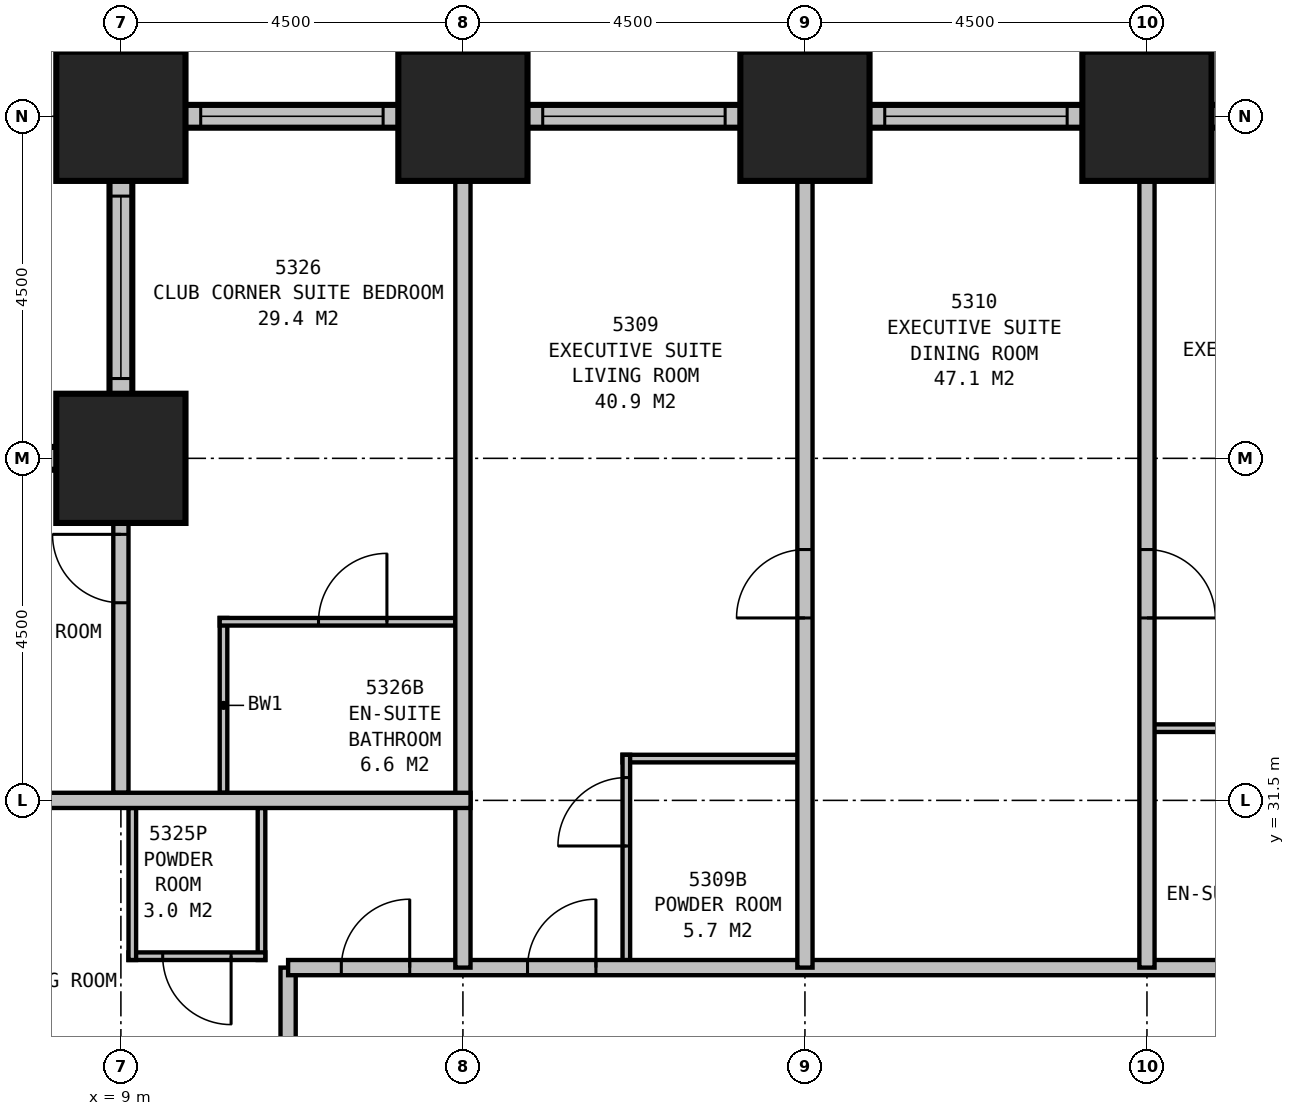
"""IFC4 building model, lengths in metres.
Left out: names, types, materials, properties, quantities, classifications, styles, units other than length and angle.
Written with IfcOpenShell. Run it as: python <this file> out.ifc"""

import sys

from ifc_helpers import new_model, si_unit, direction, frame, frame_2d, origin, origin_2d, place, context, subcontext, project, spatial, rectangle, extrude, element, fill, save


model = new_model("IFC4")
c1 = context("Model", 3, precision=1e-05, world=origin(), true_north=direction((0.0, 1.0)))
c2 = subcontext(c1, "Body", "Model", "MODEL_VIEW")
j1 = project(units=[si_unit("LENGTHUNIT", "METRE"), si_unit("PLANEANGLEUNIT", "RADIAN")], contexts=[c1])
p1 = place(None, origin())
s1 = spatial("IfcSite", under=j1, at=p1, CompositionType="ELEMENT")
p2 = place(p1, origin())
s2 = spatial("IfcBuilding", under=s1, at=p2, CompositionType="ELEMENT")
p3 = place(p2, frame((0.0, 0.0, 204.4)))
s3 = spatial("IfcBuildingStorey", under=s2, at=p3, CompositionType="ELEMENT", Elevation=204.4)
for number, where, z_axis, x_axis in (
    (1, (22.5, 40.5, 0.0), (0.0, 0.0, 1.0), (1.0, 0.0, 0.0)),
    (2, (18.0, 40.5, 0.0), (0.0, 0.0, 1.0), (1.0, 0.0, 0.0)),
    (3, (13.5, 40.5, 0.0), (0.0, 0.0, 1.0), (1.0, 0.0, 0.0)),
    (4, (9.0, 40.5, 0.0), (0.0, 0.0, 1.0), (1.0, 0.0, 0.0)),
    (5, (9.0, 36.0, 0.0), (0.0, 0.0, 1.0), (1.0, 0.0, 0.0)),
):
    element("IfcColumn", number, at=place(p3, frame(where, z_axis=z_axis, x_axis=x_axis)), inside=s3, PredefinedType="COLUMN", context=c2, shape_type="SweptSolid", body=[
        extrude(rectangle(XDim=1.7, YDim=1.7, at=origin_2d()), origin(), (0.0, 0.0, 1.0), 3.5),
    ])
p4 = place(p3, frame((40.65, 40.5, 0.0), z_axis=(0.0, 0.0, 1.0), x_axis=(-1.0, 0.0, 0.0)))
e6 = element("IfcWall", 6, at=p4, inside=s3, PredefinedType="STANDARD", context=c2, shape_type="SweptSolid", body=[
    extrude(rectangle(XDim=31.8, YDim=0.3, at=frame_2d((15.9, 0.0))), origin(), (0.0, 0.0, 1.0), 2.25),
])
p5 = place(p4, frame((1.2, 0.0, 0.5)))
e7 = element("IfcOpeningElement", 7, at=p5, cuts=e6, PredefinedType="OPENING", context=c2, shape_type="SweptSolid", body=[
    extrude(rectangle(XDim=2.4, YDim=1.6, at=frame_2d((1.2, 0.8))), frame((0.0, 0.16, 0.0), z_axis=(0.0, -1.0, 0.0), x_axis=(1.0, 0.0, 0.0)), (0.0, 0.0, 1.0), 0.32),
])
p6 = place(p4, frame((5.7, 0.0, 0.5)))
e8 = element("IfcOpeningElement", 8, at=p6, cuts=e6, PredefinedType="OPENING", context=c2, shape_type="SweptSolid", body=[
    extrude(rectangle(XDim=2.4, YDim=1.6, at=frame_2d((1.2, 0.8))), frame((0.0, 0.16, 0.0), z_axis=(0.0, -1.0, 0.0), x_axis=(1.0, 0.0, 0.0)), (0.0, 0.0, 1.0), 0.32),
])
p7 = place(p4, frame((10.2, 0.0, 0.5)))
e9 = element("IfcOpeningElement", 9, at=p7, cuts=e6, PredefinedType="OPENING", context=c2, shape_type="SweptSolid", body=[
    extrude(rectangle(XDim=2.4, YDim=1.6, at=frame_2d((1.2, 0.8))), frame((0.0, 0.16, 0.0), z_axis=(0.0, -1.0, 0.0), x_axis=(1.0, 0.0, 0.0)), (0.0, 0.0, 1.0), 0.32),
])
p8 = place(p4, frame((14.7, 0.0, 0.5)))
e10 = element("IfcOpeningElement", 10, at=p8, cuts=e6, PredefinedType="OPENING", context=c2, shape_type="SweptSolid", body=[
    extrude(rectangle(XDim=2.4, YDim=1.6, at=frame_2d((1.2, 0.8))), frame((0.0, 0.16, 0.0), z_axis=(0.0, -1.0, 0.0), x_axis=(1.0, 0.0, 0.0)), (0.0, 0.0, 1.0), 0.32),
])
p9 = place(p4, frame((19.2, 0.0, 0.5)))
e11 = element("IfcOpeningElement", 11, at=p9, cuts=e6, PredefinedType="OPENING", context=c2, shape_type="SweptSolid", body=[
    extrude(rectangle(XDim=2.4, YDim=1.6, at=frame_2d((1.2, 0.8))), frame((0.0, 0.16, 0.0), z_axis=(0.0, -1.0, 0.0), x_axis=(1.0, 0.0, 0.0)), (0.0, 0.0, 1.0), 0.32),
])
p10 = place(p4, frame((23.7, 0.0, 0.5)))
e12 = element("IfcOpeningElement", 12, at=p10, cuts=e6, PredefinedType="OPENING", context=c2, shape_type="SweptSolid", body=[
    extrude(rectangle(XDim=2.4, YDim=1.6, at=frame_2d((1.2, 0.8))), frame((0.0, 0.16, 0.0), z_axis=(0.0, -1.0, 0.0), x_axis=(1.0, 0.0, 0.0)), (0.0, 0.0, 1.0), 0.32),
])
p11 = place(p4, frame((28.2, 0.0, 0.5)))
e13 = element("IfcOpeningElement", 13, at=p11, cuts=e6, PredefinedType="OPENING", context=c2, shape_type="SweptSolid", body=[
    extrude(rectangle(XDim=2.4, YDim=1.6, at=frame_2d((1.2, 0.8))), frame((0.0, 0.16, 0.0), z_axis=(0.0, -1.0, 0.0), x_axis=(1.0, 0.0, 0.0)), (0.0, 0.0, 1.0), 0.32),
])
p12 = place(p3, frame((9.0, 40.65, 0.0), z_axis=(0.0, 0.0, 1.0), x_axis=(0.0, -1.0, 0.0)))
e14 = element("IfcWall", 14, at=p12, inside=s3, PredefinedType="STANDARD", context=c2, shape_type="SweptSolid", body=[
    extrude(rectangle(XDim=4.8, YDim=0.3, at=frame_2d((2.4, 0.0))), origin(), (0.0, 0.0, 1.0), 2.25),
])
p13 = place(p12, frame((1.2, 0.0, 0.5)))
e15 = element("IfcOpeningElement", 15, at=p13, cuts=e14, PredefinedType="OPENING", context=c2, shape_type="SweptSolid", body=[
    extrude(rectangle(XDim=2.4, YDim=1.6, at=frame_2d((1.2, 0.8))), frame((0.0, 0.16, 0.0), z_axis=(0.0, -1.0, 0.0), x_axis=(1.0, 0.0, 0.0)), (0.0, 0.0, 1.0), 0.32),
])
p14 = place(p3, frame((9.15, 36.0, 0.0), z_axis=(0.0, 0.0, 1.0), x_axis=(-1.0, 0.0, 0.0)))
e16 = element("IfcWall", 16, at=p14, inside=s3, PredefinedType="STANDARD", context=c2, shape_type="SweptSolid", body=[
    extrude(rectangle(XDim=5.3, YDim=0.3, at=frame_2d((2.65, 0.0))), origin(), (0.0, 0.0, 1.0), 2.25),
])
p15 = place(p14, frame((1.45, 0.0, 0.5)))
e17 = element("IfcOpeningElement", 17, at=p15, cuts=e16, PredefinedType="OPENING", context=c2, shape_type="SweptSolid", body=[
    extrude(rectangle(XDim=2.4, YDim=1.6, at=frame_2d((1.2, 0.8))), frame((0.0, 0.16, 0.0), z_axis=(0.0, -1.0, 0.0), x_axis=(1.0, 0.0, 0.0)), (0.0, 0.0, 1.0), 0.32),
])
p16 = place(p3, frame((11.2, 29.3, 0.0), z_axis=(0.0, 0.0, 1.0), x_axis=(1.0, 0.0, 0.0)))
e18 = element("IfcWall", 18, at=p16, inside=s3, PredefinedType="PARTITIONING", context=c2, shape_type="SweptSolid", body=[
    extrude(rectangle(XDim=27.1, YDim=0.2, at=frame_2d((13.55, 0.0))), origin(), (0.0, 0.0, 1.0), 3.25),
])
p17 = place(p16, frame((3.15, 0.0, 0.0)))
e19 = element("IfcOpeningElement", 19, at=p17, cuts=e18, PredefinedType="OPENING", context=c2, shape_type="SweptSolid", body=[
    extrude(rectangle(XDim=0.9, YDim=2.1, at=frame_2d((0.45, 1.05))), frame((0.0, 0.11, 0.0), z_axis=(0.0, -1.0, 0.0), x_axis=(1.0, 0.0, 0.0)), (0.0, 0.0, 1.0), 0.22),
])
p18 = place(p16, frame((16.65, 0.0, 0.0)))
e20 = element("IfcOpeningElement", 20, at=p18, cuts=e18, PredefinedType="OPENING", context=c2, shape_type="SweptSolid", body=[
    extrude(rectangle(XDim=0.9, YDim=2.1, at=frame_2d((0.45, 1.05))), frame((0.0, 0.11, 0.0), z_axis=(0.0, -1.0, 0.0), x_axis=(1.0, 0.0, 0.0)), (0.0, 0.0, 1.0), 0.22),
])
p19 = place(p16, frame((25.5, 0.0, 0.0)))
e21 = element("IfcOpeningElement", 21, at=p19, cuts=e18, PredefinedType="OPENING", context=c2, shape_type="SweptSolid", body=[
    extrude(rectangle(XDim=0.9, YDim=2.1, at=frame_2d((0.45, 1.05))), frame((0.0, 0.11, 0.0), z_axis=(0.0, -1.0, 0.0), x_axis=(1.0, 0.0, 0.0)), (0.0, 0.0, 1.0), 0.22),
])
p20 = place(p16, frame((0.7, 0.0, 0.0)))
e22 = element("IfcOpeningElement", 22, at=p20, cuts=e18, PredefinedType="OPENING", context=c2, shape_type="SweptSolid", body=[
    extrude(rectangle(XDim=0.9, YDim=2.1, at=frame_2d((0.45, 1.05))), frame((0.0, 0.11, 0.0), z_axis=(0.0, -1.0, 0.0), x_axis=(1.0, 0.0, 0.0)), (0.0, 0.0, 1.0), 0.22),
])
p21 = place(p3, frame((11.2, 10.6, 0.0), z_axis=(0.0, 0.0, 1.0), x_axis=(0.0, 1.0, 0.0)))
e23 = element("IfcWall", 23, at=p21, inside=s3, PredefinedType="PARTITIONING", context=c2, shape_type="SweptSolid", body=[
    extrude(rectangle(XDim=18.7, YDim=0.2, at=frame_2d((9.35, 0.0))), origin(), (0.0, 0.0, 1.0), 3.25),
])
p22 = place(p21, frame((4.9, 0.0, 0.0)))
e24 = element("IfcOpeningElement", 24, at=p22, cuts=e23, PredefinedType="OPENING", context=c2, shape_type="SweptSolid", body=[
    extrude(rectangle(XDim=1.0, YDim=2.1, at=frame_2d((0.5, 1.05))), frame((0.0, 0.11, 0.0), z_axis=(0.0, -1.0, 0.0), x_axis=(1.0, 0.0, 0.0)), (0.0, 0.0, 1.0), 0.22),
])
p23 = place(p21, frame((9.35, 0.0, 0.0)))
e25 = element("IfcOpeningElement", 25, at=p23, cuts=e23, PredefinedType="OPENING", context=c2, shape_type="SweptSolid", body=[
    extrude(rectangle(XDim=0.9, YDim=2.1, at=frame_2d((0.45, 1.05))), frame((0.0, 0.11, 0.0), z_axis=(0.0, -1.0, 0.0), x_axis=(1.0, 0.0, 0.0)), (0.0, 0.0, 1.0), 0.22),
])
p24 = place(p3, frame((18.0, 29.3, 0.0), z_axis=(0.0, 0.0, 1.0), x_axis=(0.0, 1.0, 0.0)))
e26 = element("IfcWall", 26, at=p24, inside=s3, PredefinedType="PARTITIONING", context=c2, shape_type="SweptSolid", body=[
    extrude(rectangle(XDim=11.2, YDim=0.2, at=frame_2d((5.6, 0.0))), origin(), (0.0, 0.0, 1.0), 2.25),
])
p25 = place(p24, frame((4.6, 0.0, 0.0)))
e27 = element("IfcOpeningElement", 27, at=p25, cuts=e26, PredefinedType="OPENING", context=c2, shape_type="SweptSolid", body=[
    extrude(rectangle(XDim=0.9, YDim=2.1, at=frame_2d((0.45, 1.05))), frame((0.0, 0.11, 0.0), z_axis=(0.0, -1.0, 0.0), x_axis=(1.0, 0.0, 0.0)), (0.0, 0.0, 1.0), 0.22),
])
p26 = place(p3, frame((22.5, 29.3, 0.0), z_axis=(0.0, 0.0, 1.0), x_axis=(0.0, 1.0, 0.0)))
e28 = element("IfcWall", 28, at=p26, inside=s3, PredefinedType="PARTITIONING", context=c2, shape_type="SweptSolid", body=[
    extrude(rectangle(XDim=11.2, YDim=0.2, at=frame_2d((5.6, 0.0))), origin(), (0.0, 0.0, 1.0), 2.25),
])
p27 = place(p26, frame((5.5, 0.0, 0.0), z_axis=(0.0, 0.0, 1.0), x_axis=(-1.0, 0.0, 0.0)))
e29 = element("IfcOpeningElement", 29, at=p27, cuts=e28, PredefinedType="OPENING", context=c2, shape_type="SweptSolid", body=[
    extrude(rectangle(XDim=0.9, YDim=2.1, at=frame_2d((0.45, 1.05))), frame((0.0, 0.11, 0.0), z_axis=(0.0, -1.0, 0.0), x_axis=(1.0, 0.0, 0.0)), (0.0, 0.0, 1.0), 0.22),
])
p28 = place(p3, frame((15.6, 32.05, 0.0), z_axis=(0.0, 0.0, 1.0), x_axis=(1.0, 0.0, 0.0)))
e30 = element("IfcWall", 30, at=p28, inside=s3, PredefinedType="PLUMBINGWALL", context=c2, shape_type="SweptSolid", body=[
    extrude(rectangle(XDim=2.4, YDim=0.1, at=frame_2d((1.2, 0.0))), origin(), (0.0, 0.0, 1.0), 3.25),
])
p29 = place(p3, frame((15.65, 29.3, 0.0), z_axis=(0.0, 0.0, 1.0), x_axis=(0.0, 1.0, 0.0)))
e31 = element("IfcWall", 31, at=p29, inside=s3, PredefinedType="PLUMBINGWALL", context=c2, shape_type="SweptSolid", body=[
    extrude(rectangle(XDim=2.8, YDim=0.1, at=frame_2d((1.4, 0.0))), origin(), (0.0, 0.0, 1.0), 3.25),
])
p30 = place(p29, frame((1.6, 0.0, 0.0)))
e32 = element("IfcOpeningElement", 32, at=p30, cuts=e31, PredefinedType="OPENING", context=c2, shape_type="SweptSolid", body=[
    extrude(rectangle(XDim=0.9, YDim=2.1, at=frame_2d((0.45, 1.05))), frame((0.0, 0.06, 0.0), z_axis=(0.0, -1.0, 0.0), x_axis=(1.0, 0.0, 0.0)), (0.0, 0.0, 1.0), 0.12),
])
p31 = place(p3, frame((22.5, 32.45, 0.0), z_axis=(0.0, 0.0, 1.0), x_axis=(1.0, 0.0, 0.0)))
e33 = element("IfcWall", 33, at=p31, inside=s3, PredefinedType="PLUMBINGWALL", context=c2, shape_type="SweptSolid", body=[
    extrude(rectangle(XDim=3.15, YDim=0.1, at=frame_2d((1.575, 0.0))), origin(), (0.0, 0.0, 1.0), 3.25),
])
p32 = place(p3, frame((13.5, 29.3, 0.0), z_axis=(0.0, 0.0, 1.0), x_axis=(0.0, 1.0, 0.0)))
e34 = element("IfcWall", 34, at=p32, inside=s3, PredefinedType="PARTITIONING", context=c2, shape_type="SweptSolid", body=[
    extrude(rectangle(XDim=11.2, YDim=0.2, at=frame_2d((5.6, 0.0))), origin(), (0.0, 0.0, 1.0), 2.25),
])
p33 = place(p3, frame((13.6, 31.5, 0.0), z_axis=(0.0, 0.0, 1.0), x_axis=(-1.0, 0.0, 0.0)))
e35 = element("IfcWall", 35, at=p33, inside=s3, PredefinedType="PARTITIONING", context=c2, shape_type="SweptSolid", body=[
    extrude(rectangle(XDim=10.099, YDim=0.2, at=frame_2d((5.05, 0.0))), origin(), (0.0, 0.0, 1.0), 3.25),
])
p34 = place(p33, frame((8.999, 0.0, 0.0), z_axis=(0.0, 0.0, 1.0), x_axis=(-1.0, 0.0, 0.0)))
e36 = element("IfcOpeningElement", 36, at=p34, cuts=e35, PredefinedType="OPENING", context=c2, shape_type="SweptSolid", body=[
    extrude(rectangle(XDim=0.9, YDim=2.1, at=frame_2d((0.45, 1.05))), frame((0.0, 0.11, 0.0), z_axis=(0.0, -1.0, 0.0), x_axis=(1.0, 0.0, 0.0)), (0.0, 0.0, 1.0), 0.22),
])
p35 = place(p3, frame((9.15, 31.4, 0.0), z_axis=(0.0, 0.0, 1.0), x_axis=(0.0, -1.0, 0.0)))
e37 = element("IfcWall", 37, at=p35, inside=s3, PredefinedType="PLUMBINGWALL", context=c2, shape_type="SweptSolid", body=[
    extrude(rectangle(XDim=2.0, YDim=0.1, at=frame_2d((1.0, 0.0))), origin(), (0.0, 0.0, 1.0), 2.25),
])
p36 = place(p3, frame((10.85, 31.4, 0.0), z_axis=(0.0, 0.0, 1.0), x_axis=(0.0, -1.0, 0.0)))
e38 = element("IfcWall", 38, at=p36, inside=s3, PredefinedType="PLUMBINGWALL", context=c2, shape_type="SweptSolid", body=[
    extrude(rectangle(XDim=2.0, YDim=0.1, at=frame_2d((1.0, 0.0))), origin(), (0.0, 0.0, 1.0), 3.25),
])
p37 = place(p3, frame((10.9, 29.45, 0.0), z_axis=(0.0, 0.0, 1.0), x_axis=(-1.0, 0.0, 0.0)))
e39 = element("IfcWall", 39, at=p37, inside=s3, PredefinedType="PLUMBINGWALL", context=c2, shape_type="SweptSolid", body=[
    extrude(rectangle(XDim=1.8, YDim=0.1, at=frame_2d((0.9, 0.0))), origin(), (0.0, 0.0, 1.0), 3.25),
])
p38 = place(p37, frame((0.45, 0.0, 0.0)))
e40 = element("IfcOpeningElement", 40, at=p38, cuts=e39, PredefinedType="OPENING", context=c2, shape_type="SweptSolid", body=[
    extrude(rectangle(XDim=0.9, YDim=2.1, at=frame_2d((0.45, 1.05))), frame((0.0, 0.06, 0.0), z_axis=(0.0, -1.0, 0.0), x_axis=(1.0, 0.0, 0.0)), (0.0, 0.0, 1.0), 0.12),
])
p39 = place(p3, frame((9.0, 31.6, 0.0), z_axis=(0.0, 0.0, 1.0), x_axis=(0.0, 1.0, 0.0)))
e41 = element("IfcWall", 41, at=p39, inside=s3, PredefinedType="PARTITIONING", context=c2, shape_type="SweptSolid", body=[
    extrude(rectangle(XDim=4.4, YDim=0.2, at=frame_2d((2.2, 0.0))), origin(), (0.0, 0.0, 1.0), 2.25),
])
p40 = place(p39, frame((2.5, 0.0, 0.0)))
e42 = element("IfcOpeningElement", 42, at=p40, cuts=e41, PredefinedType="OPENING", context=c2, shape_type="SweptSolid", body=[
    extrude(rectangle(XDim=0.9, YDim=2.1, at=frame_2d((0.45, 1.05))), frame((0.0, 0.11, 0.0), z_axis=(0.0, -1.0, 0.0), x_axis=(1.0, 0.0, 0.0)), (0.0, 0.0, 1.0), 0.22),
])
p41 = place(p3, frame((10.35, 31.6, 0.0), z_axis=(0.0, 0.0, 1.0), x_axis=(0.0, 1.0, 0.0)))
e43 = element("IfcWall", 43, at=p41, inside=s3, PredefinedType="PLUMBINGWALL", context=c2, shape_type="SweptSolid", body=[
    extrude(rectangle(XDim=2.3, YDim=0.1, at=frame_2d((1.15, 0.0))), origin(), (0.0, 0.0, 1.0), 3.25),
])
p42 = place(p3, frame((13.4, 33.85, 0.0), z_axis=(0.0, 0.0, 1.0), x_axis=(-1.0, 0.0, 0.0)))
e44 = element("IfcWall", 44, at=p42, inside=s3, PredefinedType="PLUMBINGWALL", context=c2, shape_type="SweptSolid", body=[
    extrude(rectangle(XDim=3.1, YDim=0.1, at=frame_2d((1.55, 0.0))), origin(), (0.0, 0.0, 1.0), 3.25),
])
p43 = place(p42, frame((1.8, 0.0, 0.0), z_axis=(0.0, 0.0, 1.0), x_axis=(-1.0, 0.0, 0.0)))
e45 = element("IfcOpeningElement", 45, at=p43, cuts=e44, PredefinedType="OPENING", context=c2, shape_type="SweptSolid", body=[
    extrude(rectangle(XDim=0.9, YDim=2.1, at=frame_2d((0.45, 1.05))), frame((0.0, 0.06, 0.0), z_axis=(0.0, -1.0, 0.0), x_axis=(1.0, 0.0, 0.0)), (0.0, 0.0, 1.0), 0.12),
])
p44 = place(p9, origin())
e46 = element("IfcWindow", 46, at=p44, inside=s3, PartitioningType="SINGLE_PANEL", PredefinedType="WINDOW", context=c2, shape_type="SweptSolid", body=[
    extrude(rectangle(XDim=2.4, YDim=1.6, at=frame_2d((1.2, 0.8))), frame((0.0, 0.03, 0.0), z_axis=(0.0, -1.0, 0.0), x_axis=(1.0, 0.0, 0.0)), (0.0, 0.0, 1.0), 0.06),
])
fill(e11, e46)
p45 = place(p10, origin())
e47 = element("IfcWindow", 47, at=p45, inside=s3, PartitioningType="SINGLE_PANEL", PredefinedType="WINDOW", context=c2, shape_type="SweptSolid", body=[
    extrude(rectangle(XDim=2.4, YDim=1.6, at=frame_2d((1.2, 0.8))), frame((0.0, 0.03, 0.0), z_axis=(0.0, -1.0, 0.0), x_axis=(1.0, 0.0, 0.0)), (0.0, 0.0, 1.0), 0.06),
])
fill(e12, e47)
p46 = place(p11, origin())
e48 = element("IfcWindow", 48, at=p46, inside=s3, PartitioningType="SINGLE_PANEL", PredefinedType="WINDOW", context=c2, shape_type="SweptSolid", body=[
    extrude(rectangle(XDim=2.4, YDim=1.6, at=frame_2d((1.2, 0.8))), frame((0.0, 0.03, 0.0), z_axis=(0.0, -1.0, 0.0), x_axis=(1.0, 0.0, 0.0)), (0.0, 0.0, 1.0), 0.06),
])
fill(e13, e48)
p47 = place(p13, origin())
e49 = element("IfcWindow", 49, at=p47, inside=s3, PartitioningType="SINGLE_PANEL", PredefinedType="WINDOW", context=c2, shape_type="SweptSolid", body=[
    extrude(rectangle(XDim=2.4, YDim=1.6, at=frame_2d((1.2, 0.8))), frame((0.0, 0.03, 0.0), z_axis=(0.0, -1.0, 0.0), x_axis=(1.0, 0.0, 0.0)), (0.0, 0.0, 1.0), 0.06),
])
fill(e15, e49)
p48 = place(p17, origin())
e50 = element("IfcDoor", 50, at=p48, inside=s3, OperationType="SINGLE_SWING_RIGHT", PredefinedType="DOOR", context=c2, shape_type="SweptSolid", body=[
    extrude(rectangle(XDim=0.9, YDim=2.1, at=frame_2d((0.45, 1.05))), frame((0.0, 0.025, 0.0), z_axis=(0.0, -1.0, 0.0), x_axis=(1.0, 0.0, 0.0)), (0.0, 0.0, 1.0), 0.05),
])
fill(e19, e50)
p49 = place(p20, origin())
e51 = element("IfcDoor", 51, at=p49, inside=s3, OperationType="SINGLE_SWING_RIGHT", PredefinedType="DOOR", context=c2, shape_type="SweptSolid", body=[
    extrude(rectangle(XDim=0.9, YDim=2.1, at=frame_2d((0.45, 1.05))), frame((0.0, 0.025, 0.0), z_axis=(0.0, -1.0, 0.0), x_axis=(1.0, 0.0, 0.0)), (0.0, 0.0, 1.0), 0.05),
])
fill(e22, e51)
p50 = place(p25, origin())
e52 = element("IfcDoor", 52, at=p50, inside=s3, OperationType="SINGLE_SWING_LEFT", PredefinedType="DOOR", context=c2, shape_type="SweptSolid", body=[
    extrude(rectangle(XDim=0.9, YDim=2.1, at=frame_2d((0.45, 1.05))), frame((0.0, 0.025, 0.0), z_axis=(0.0, -1.0, 0.0), x_axis=(1.0, 0.0, 0.0)), (0.0, 0.0, 1.0), 0.05),
])
fill(e27, e52)
p51 = place(p27, origin())
e53 = element("IfcDoor", 53, at=p51, inside=s3, OperationType="SINGLE_SWING_RIGHT", PredefinedType="DOOR", context=c2, shape_type="SweptSolid", body=[
    extrude(rectangle(XDim=0.9, YDim=2.1, at=frame_2d((0.45, 1.05))), frame((0.0, 0.025, 0.0), z_axis=(0.0, -1.0, 0.0), x_axis=(1.0, 0.0, 0.0)), (0.0, 0.0, 1.0), 0.05),
])
fill(e29, e53)
p52 = place(p30, origin())
e54 = element("IfcDoor", 54, at=p52, inside=s3, OperationType="SINGLE_SWING_LEFT", PredefinedType="DOOR", context=c2, shape_type="SweptSolid", body=[
    extrude(rectangle(XDim=0.9, YDim=2.1, at=frame_2d((0.45, 1.05))), frame((0.0, 0.025, 0.0), z_axis=(0.0, -1.0, 0.0), x_axis=(1.0, 0.0, 0.0)), (0.0, 0.0, 1.0), 0.05),
])
fill(e32, e54)
p53 = place(p38, origin())
e55 = element("IfcDoor", 55, at=p53, inside=s3, OperationType="SINGLE_SWING_LEFT", PredefinedType="DOOR", context=c2, shape_type="SweptSolid", body=[
    extrude(rectangle(XDim=0.9, YDim=2.1, at=frame_2d((0.45, 1.05))), frame((0.0, 0.025, 0.0), z_axis=(0.0, -1.0, 0.0), x_axis=(1.0, 0.0, 0.0)), (0.0, 0.0, 1.0), 0.05),
])
fill(e40, e55)
p54 = place(p40, origin())
e56 = element("IfcDoor", 56, at=p54, inside=s3, OperationType="SINGLE_SWING_RIGHT", PredefinedType="DOOR", context=c2, shape_type="SweptSolid", body=[
    extrude(rectangle(XDim=0.9, YDim=2.1, at=frame_2d((0.45, 1.05))), frame((0.0, 0.025, 0.0), z_axis=(0.0, -1.0, 0.0), x_axis=(1.0, 0.0, 0.0)), (0.0, 0.0, 1.0), 0.05),
])
fill(e42, e56)
p55 = place(p43, origin())
e57 = element("IfcDoor", 57, at=p55, inside=s3, OperationType="SINGLE_SWING_RIGHT", PredefinedType="DOOR", context=c2, shape_type="SweptSolid", body=[
    extrude(rectangle(XDim=0.9, YDim=2.1, at=frame_2d((0.45, 1.05))), frame((0.0, 0.025, 0.0), z_axis=(0.0, -1.0, 0.0), x_axis=(1.0, 0.0, 0.0)), (0.0, 0.0, 1.0), 0.05),
])
fill(e45, e57)
save(model, sys.argv[1])
